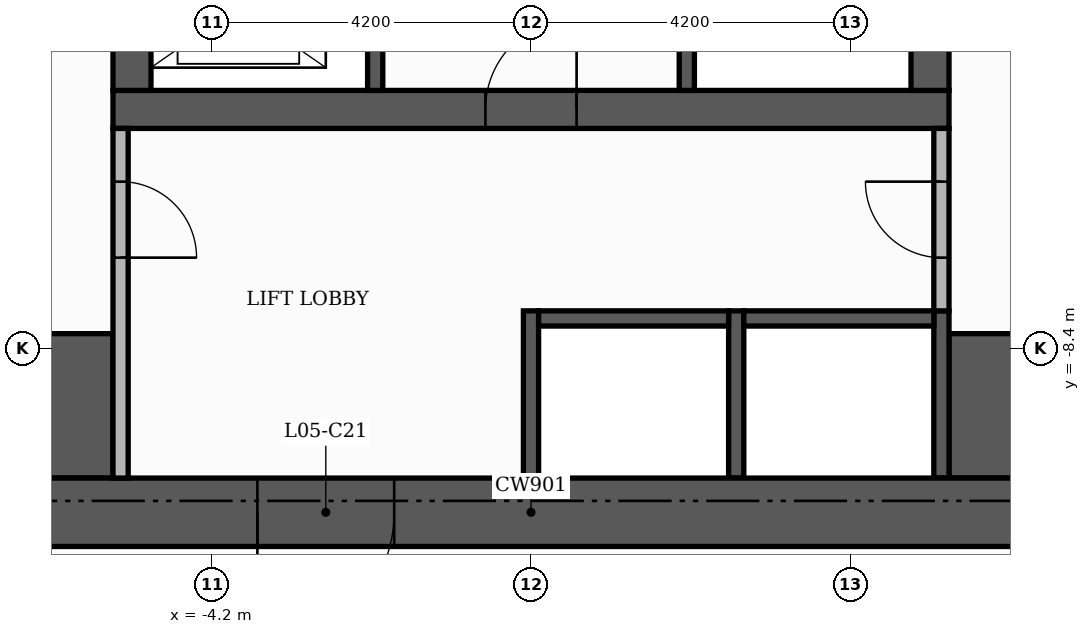
"""IFC4 building model, lengths in metres.
Left out: names, types, materials, properties, quantities, classifications, styles, units other than length and angle.
Written with IfcOpenShell. Run it as: python <this file> out.ifc"""

import sys

from ifc_helpers import new_model, si_unit, direction, frame, frame_2d, origin, place, context, subcontext, project, spatial, rectangle, extrude, element, fill, save


model = new_model("IFC4")
c1 = context("Model", 3, precision=1e-05, world=origin(), true_north=direction((0.0, 1.0)))
c2 = subcontext(c1, "Body", "Model", "MODEL_VIEW")
j1 = project(units=[si_unit("LENGTHUNIT", "METRE"), si_unit("PLANEANGLEUNIT", "RADIAN")], contexts=[c1])
p1 = place(None, origin())
s1 = spatial("IfcSite", under=j1, at=p1, CompositionType="ELEMENT")
p2 = place(p1, origin())
s2 = spatial("IfcBuilding", under=s1, at=p2, CompositionType="ELEMENT")
p3 = place(p2, frame((0.0, 0.0, 27.0)))
s3 = spatial("IfcBuildingStorey", under=s2, at=p3, CompositionType="ELEMENT", Elevation=27.0)
p4 = place(p3, frame((-5.5, -5.25, 0.0), z_axis=(0.0, 0.0, 1.0), x_axis=(1.0, 0.0, 0.0)))
e1 = element("IfcWall", 1, at=p4, inside=s3, PredefinedType="SHEAR", context=c2, shape_type="SweptSolid", body=[
    extrude(rectangle(XDim=11.0, YDim=0.5, at=frame_2d((5.5, 0.0))), origin(), (0.0, 0.0, 1.0), 3.48),
])
p5 = place(p4, frame((4.9, 0.0, 0.0)))
e2 = element("IfcOpeningElement", 2, at=p5, cuts=e1, PredefinedType="OPENING", context=c2, shape_type="SweptSolid", body=[
    extrude(rectangle(XDim=1.2, YDim=2.1, at=frame_2d((0.6, 1.05))), frame((0.0, 0.26, 0.0), z_axis=(0.0, -1.0, 0.0), x_axis=(1.0, 0.0, 0.0)), (0.0, 0.0, 1.0), 0.52),
])
for number, where, z_axis, x_axis in (
    (3, (-5.25, -5.0, 0.0), (0.0, 0.0, 1.0), (0.0, 1.0, 0.0)),
    (4, (5.25, -5.0, 0.0), (0.0, 0.0, 1.0), (0.0, 1.0, 0.0)),
):
    element("IfcWall", number, at=place(p3, frame(where, z_axis=z_axis, x_axis=x_axis)), inside=s3, PredefinedType="SHEAR", context=c2, shape_type="SweptSolid", body=[
        extrude(rectangle(XDim=10.5, YDim=0.5, at=frame_2d((5.25, 0.0))), origin(), (0.0, 0.0, 1.0), 3.48),
    ])
for number, where, z_axis, x_axis in (
    (5, (-10.1, -9.15, 0.0), (0.0, 0.0, 1.0), (1.0, 0.0, 0.0)),
    (6, (5.5, -9.15, 0.0), (0.0, 0.0, 1.0), (1.0, 0.0, 0.0)),
):
    element("IfcWall", number, at=place(p3, frame(where, z_axis=z_axis, x_axis=x_axis)), inside=s3, PredefinedType="SHEAR", context=c2, shape_type="SweptSolid", body=[
        extrude(rectangle(XDim=4.6, YDim=1.9, at=frame_2d((2.3, 0.0))), origin(), (0.0, 0.0, 1.0), 3.48),
    ])
p6 = place(p3, frame((2.05, -5.0, 0.0), z_axis=(0.0, 0.0, 1.0), x_axis=(0.0, 1.0, 0.0)))
e7 = element("IfcWall", 7, at=p6, inside=s3, PredefinedType="SHEAR", context=c2, shape_type="SweptSolid", body=[
    extrude(rectangle(XDim=6.6, YDim=0.2, at=frame_2d((3.3, 0.0))), origin(), (0.0, 0.0, 1.0), 3.48),
])
p7 = place(p6, frame((5.25, 0.0, 0.0)))
e8 = element("IfcOpeningElement", 8, at=p7, cuts=e7, PredefinedType="OPENING", context=c2, shape_type="SweptSolid", body=[
    extrude(rectangle(XDim=1.0, YDim=2.1, at=frame_2d((0.5, 1.05))), frame((0.0, 0.11, 0.0), z_axis=(0.0, -1.0, 0.0), x_axis=(1.0, 0.0, 0.0)), (0.0, 0.0, 1.0), 0.22),
])
for number, where, z_axis, x_axis in (
    (9, (0.0, -10.1, 0.0), (0.0, 0.0, 1.0), (0.0, 1.0, 0.0)),
    (10, (2.7, -10.1, 0.0), (0.0, 0.0, 1.0), (0.0, 1.0, 0.0)),
    (11, (5.4, -10.1, 0.0), (0.0, 0.0, 1.0), (0.0, 1.0, 0.0)),
):
    element("IfcWall", number, at=place(p3, frame(where, z_axis=z_axis, x_axis=x_axis)), inside=s3, PredefinedType="SHEAR", context=c2, shape_type="SweptSolid", body=[
        extrude(rectangle(XDim=2.2, YDim=0.2, at=frame_2d((1.1, 0.0))), origin(), (0.0, 0.0, 1.0), 3.48),
    ])
for number, where, z_axis, x_axis in (
    (12, (0.1, -8.0, 0.0), (0.0, 0.0, 1.0), (1.0, 0.0, 0.0)),
    (13, (2.8, -8.0, 0.0), (0.0, 0.0, 1.0), (1.0, 0.0, 0.0)),
):
    element("IfcWall", number, at=place(p3, frame(where, z_axis=z_axis, x_axis=x_axis)), inside=s3, PredefinedType="SHEAR", context=c2, shape_type="SweptSolid", body=[
        extrude(rectangle(XDim=2.5, YDim=0.2, at=frame_2d((1.25, 0.0))), origin(), (0.0, 0.0, 1.0), 3.48),
    ])
p8 = place(p3, frame((-2.05, -5.0, 0.0), z_axis=(0.0, 0.0, 1.0), x_axis=(0.0, 1.0, 0.0)))
e14 = element("IfcWall", 14, at=p8, inside=s3, PredefinedType="SHEAR", context=c2, shape_type="SweptSolid", body=[
    extrude(rectangle(XDim=3.4, YDim=0.2, at=frame_2d((1.7, 0.0))), origin(), (0.0, 0.0, 1.0), 3.48),
])
p9 = place(p8, frame((0.55, 0.0, 0.0)))
e15 = element("IfcOpeningElement", 15, at=p9, cuts=e14, PredefinedType="OPENING", context=c2, shape_type="SweptSolid", body=[
    extrude(rectangle(XDim=1.1, YDim=2.1, at=frame_2d((0.55, 1.05))), frame((0.0, 0.11, 0.0), z_axis=(0.0, -1.0, 0.0), x_axis=(1.0, 0.0, 0.0)), (0.0, 0.0, 1.0), 0.22),
])
p10 = place(p8, frame((2.45, 0.0, 0.0)))
e16 = element("IfcOpeningElement", 16, at=p10, cuts=e14, PredefinedType="OPENING", context=c2, shape_type="SweptSolid", body=[
    extrude(rectangle(XDim=0.8, YDim=2.1, at=frame_2d((0.4, 1.05))), frame((0.0, 0.11, 0.0), z_axis=(0.0, -1.0, 0.0), x_axis=(1.0, 0.0, 0.0)), (0.0, 0.0, 1.0), 0.22),
])
p11 = place(p3, frame((-11.0, -10.55, 0.0), z_axis=(0.0, 0.0, 1.0), x_axis=(1.0, 0.0, 0.0)))
e17 = element("IfcWall", 17, at=p11, inside=s3, PredefinedType="SHEAR", context=c2, shape_type="SweptSolid", body=[
    extrude(rectangle(XDim=22.0, YDim=0.9, at=frame_2d((11.0, 0.0))), origin(), (0.0, 0.0, 1.0), 3.48),
])
p12 = place(p11, frame((7.4, 0.0, 0.0)))
e18 = element("IfcOpeningElement", 18, at=p12, cuts=e17, PredefinedType="OPENING", context=c2, shape_type="SweptSolid", body=[
    extrude(rectangle(XDim=1.8, YDim=2.2, at=frame_2d((0.9, 1.1))), frame((0.0, 0.46, 0.0), z_axis=(0.0, -1.0, 0.0), x_axis=(1.0, 0.0, 0.0)), (0.0, 0.0, 1.0), 0.92),
])
p13 = place(p3, frame((-5.4, -10.1, 0.0), z_axis=(0.0, 0.0, 1.0), x_axis=(0.0, 1.0, 0.0)))
e19 = element("IfcWall", 19, at=p13, inside=s3, PredefinedType="PARTITIONING", context=c2, shape_type="SweptSolid", body=[
    extrude(rectangle(XDim=4.6, YDim=0.2, at=frame_2d((2.3, 0.0))), origin(), (0.0, 0.0, 1.0), 3.48),
])
p14 = place(p13, frame((2.9, 0.0, 0.0)))
e20 = element("IfcOpeningElement", 20, at=p14, cuts=e19, PredefinedType="OPENING", context=c2, shape_type="SweptSolid", body=[
    extrude(rectangle(XDim=1.0, YDim=2.1, at=frame_2d((0.5, 1.05))), frame((0.0, 0.11, 0.0), z_axis=(0.0, -1.0, 0.0), x_axis=(1.0, 0.0, 0.0)), (0.0, 0.0, 1.0), 0.22),
])
p15 = place(p3, frame((5.4, -7.9, 0.0), z_axis=(0.0, 0.0, 1.0), x_axis=(0.0, 1.0, 0.0)))
e21 = element("IfcWall", 21, at=p15, inside=s3, PredefinedType="PARTITIONING", context=c2, shape_type="SweptSolid", body=[
    extrude(rectangle(XDim=2.4, YDim=0.2, at=frame_2d((1.2, 0.0))), origin(), (0.0, 0.0, 1.0), 3.48),
])
p16 = place(p15, frame((0.7, 0.0, 0.0)))
e22 = element("IfcOpeningElement", 22, at=p16, cuts=e21, PredefinedType="OPENING", context=c2, shape_type="SweptSolid", body=[
    extrude(rectangle(XDim=1.0, YDim=2.1, at=frame_2d((0.5, 1.05))), frame((0.0, 0.11, 0.0), z_axis=(0.0, -1.0, 0.0), x_axis=(1.0, 0.0, 0.0)), (0.0, 0.0, 1.0), 0.22),
])
p17 = place(p5, origin())
e23 = element("IfcDoor", 23, at=p17, inside=s3, OperationType="SINGLE_SWING_RIGHT", PredefinedType="DOOR", context=c2, shape_type="SweptSolid", body=[
    extrude(rectangle(XDim=1.2, YDim=2.1, at=frame_2d((0.6, 1.05))), frame((0.0, 0.025, 0.0), z_axis=(0.0, -1.0, 0.0), x_axis=(1.0, 0.0, 0.0)), (0.0, 0.0, 1.0), 0.05),
])
fill(e2, e23)
p18 = place(p14, frame((1.0, 0.0, 0.0), z_axis=(0.0, 0.0, 1.0), x_axis=(-1.0, 0.0, 0.0)))
e24 = element("IfcDoor", 24, at=p18, inside=s3, OperationType="SINGLE_SWING_LEFT", PredefinedType="DOOR", context=c2, shape_type="SweptSolid", body=[
    extrude(rectangle(XDim=1.0, YDim=2.1, at=frame_2d((0.5, 1.05))), frame((0.0, 0.025, 0.0), z_axis=(0.0, -1.0, 0.0), x_axis=(1.0, 0.0, 0.0)), (0.0, 0.0, 1.0), 0.05),
])
fill(e20, e24)
p19 = place(p16, origin())
e25 = element("IfcDoor", 25, at=p19, inside=s3, OperationType="SINGLE_SWING_RIGHT", PredefinedType="DOOR", context=c2, shape_type="SweptSolid", body=[
    extrude(rectangle(XDim=1.0, YDim=2.1, at=frame_2d((0.5, 1.05))), frame((0.0, 0.025, 0.0), z_axis=(0.0, -1.0, 0.0), x_axis=(1.0, 0.0, 0.0)), (0.0, 0.0, 1.0), 0.05),
])
fill(e22, e25)
p20 = place(p12, frame((1.8, 0.0, 0.0), z_axis=(0.0, 0.0, 1.0), x_axis=(-1.0, 0.0, 0.0)))
e26 = element("IfcDoor", 26, at=p20, inside=s3, OperationType="DOUBLE_DOOR_SINGLE_SWING", PredefinedType="DOOR", context=c2, shape_type="SweptSolid", body=[
    extrude(rectangle(XDim=1.8, YDim=2.2, at=frame_2d((0.9, 1.1))), frame((0.0, 0.025, 0.0), z_axis=(0.0, -1.0, 0.0), x_axis=(1.0, 0.0, 0.0)), (0.0, 0.0, 1.0), 0.05),
])
fill(e18, e26)
save(model, sys.argv[1])
